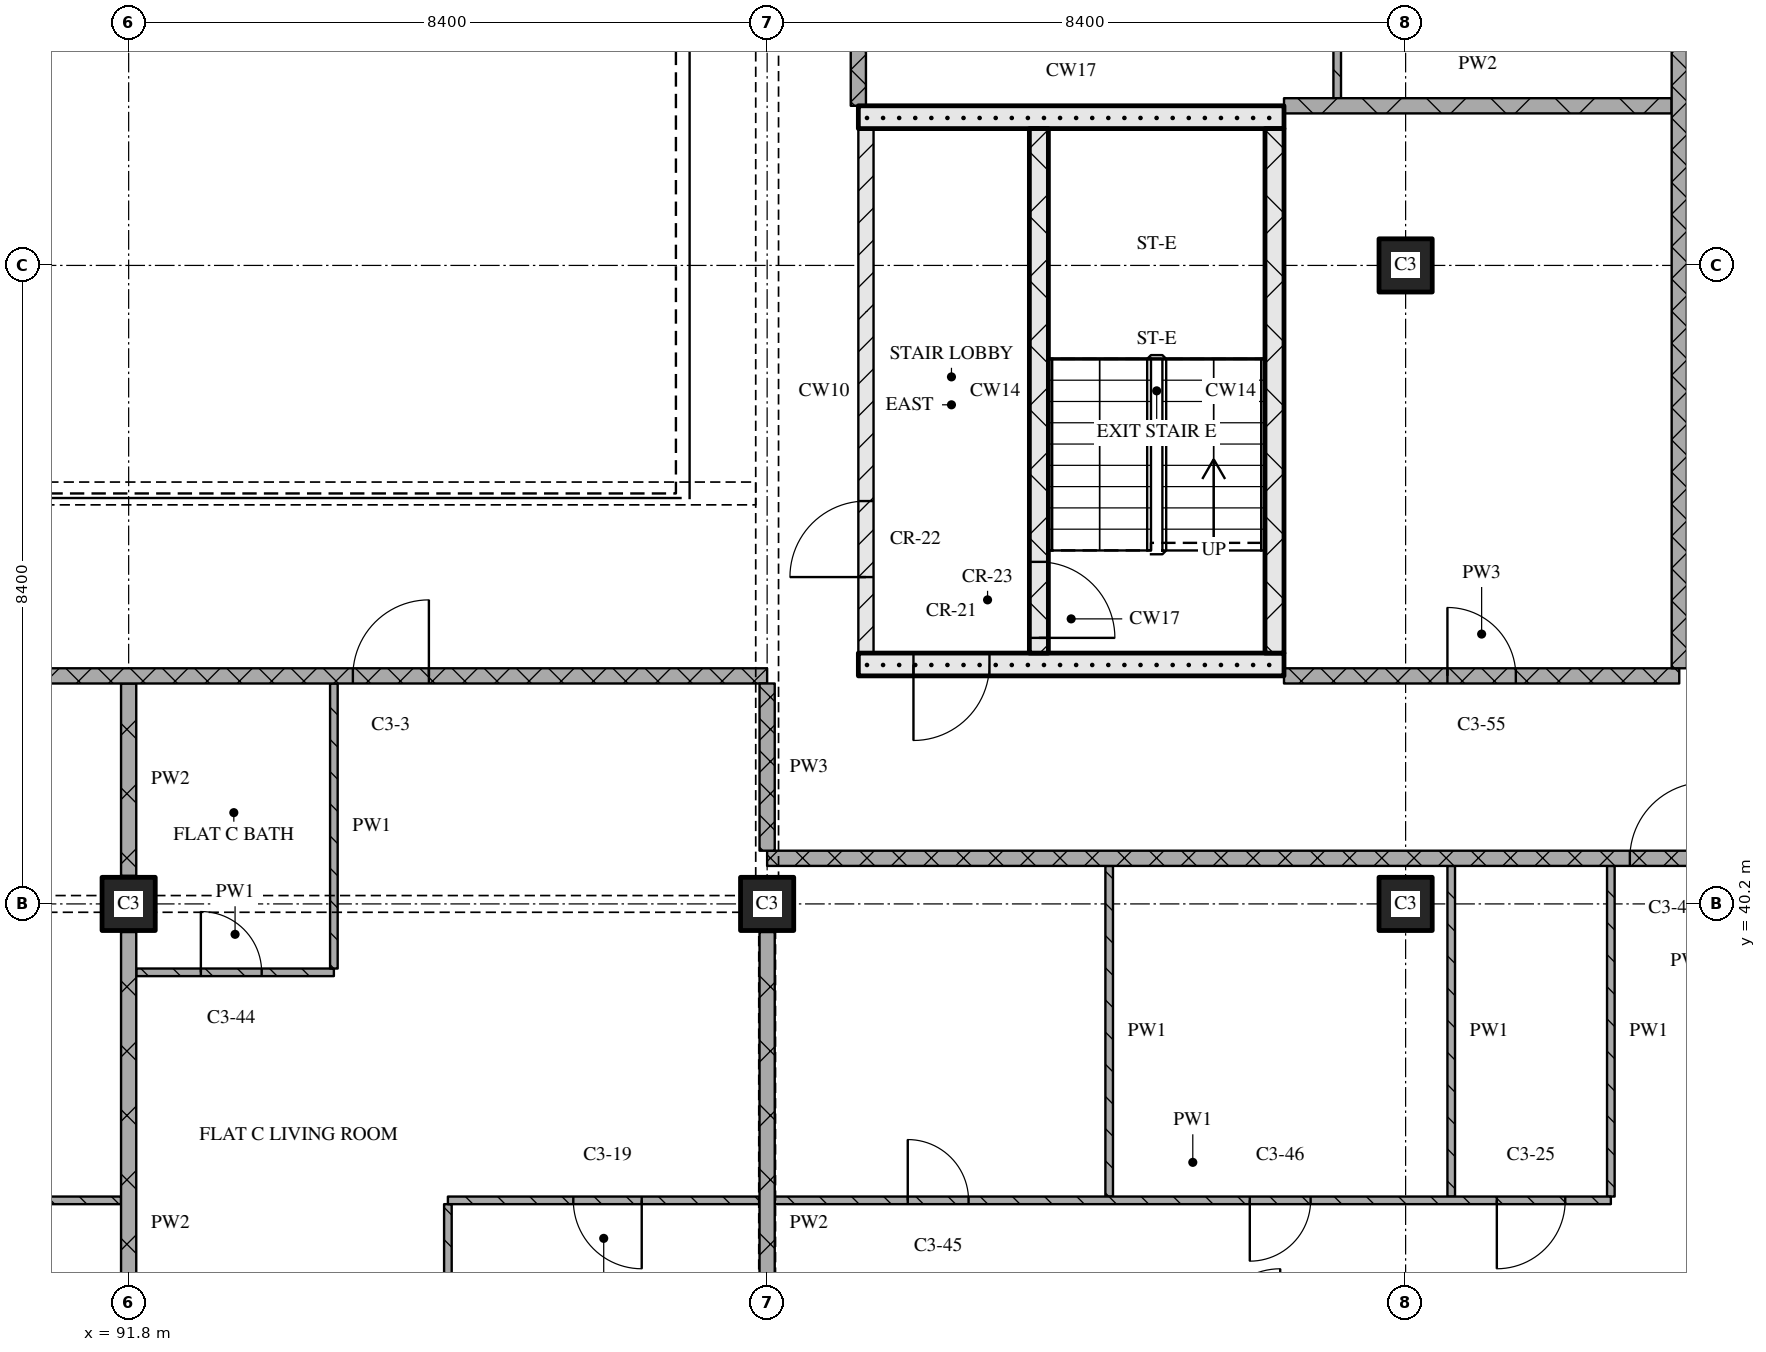
"""IFC4 building model, lengths in metres.
Left out: names, types, materials, properties, quantities, classifications, styles, units other than length and angle.
Written with IfcOpenShell. Run it as: python <this file> out.ifc"""

import sys

from ifc_helpers import new_model, si_unit, direction, frame, frame_2d, origin, origin_2d, place, context, subcontext, project, spatial, rectangle, extrude, element, fill, save


model = new_model("IFC4")
c1 = context("Model", 3, precision=1e-05, world=origin(), true_north=direction((0.0, 1.0)))
c2 = subcontext(c1, "Body", "Model", "MODEL_VIEW")
j1 = project(units=[si_unit("LENGTHUNIT", "METRE"), si_unit("PLANEANGLEUNIT", "RADIAN")], contexts=[c1])
p1 = place(None, origin())
s1 = spatial("IfcSite", under=j1, at=p1, CompositionType="ELEMENT")
p2 = place(p1, origin())
s2 = spatial("IfcBuilding", under=s1, at=p2, CompositionType="ELEMENT")
p3 = place(p2, frame((0.0, 0.0, 176.25)))
s3 = spatial("IfcBuildingStorey", under=s2, at=p3, CompositionType="ELEMENT", Elevation=176.25)
for number, where, z_axis, x_axis in (
    (1, (91.8, 40.2, 0.0), (0.0, 0.0, 1.0), (1.0, 0.0, 0.0)),
    (2, (100.2, 40.2, 0.0), (0.0, 0.0, 1.0), (1.0, 0.0, 0.0)),
    (3, (108.6, 40.2, 0.0), (0.0, 0.0, 1.0), (1.0, 0.0, 0.0)),
    (4, (108.6, 48.6, 0.0), (0.0, 0.0, 1.0), (1.0, 0.0, 0.0)),
):
    element("IfcColumn", number, at=place(p3, frame(where, z_axis=z_axis, x_axis=x_axis)), inside=s3, PredefinedType="COLUMN", context=c2, shape_type="SweptSolid", body=[
        extrude(rectangle(XDim=0.7, YDim=0.7, at=origin_2d()), origin(), (0.0, 0.0, 1.0), 3.6),
    ])
p4 = place(p3, frame((101.4, 43.35, 0.0), z_axis=(0.0, 0.0, 1.0), x_axis=(1.0, 0.0, 0.0)))
e5 = element("IfcWall", 5, at=p4, inside=s3, PredefinedType="SOLIDWALL", context=c2, shape_type="SweptSolid", body=[
    extrude(rectangle(XDim=5.6, YDim=0.3, at=frame_2d((2.8, 0.0))), origin(), (0.0, 0.0, 1.0), 3.32),
])
p5 = place(p4, frame((0.725, 0.0, 0.0)))
e6 = element("IfcOpeningElement", 6, at=p5, cuts=e5, PredefinedType="OPENING", context=c2, shape_type="SweptSolid", body=[
    extrude(rectangle(XDim=1.0, YDim=2.1, at=frame_2d((0.5, 1.05))), frame((0.0, 0.16, 0.0), z_axis=(0.0, -1.0, 0.0), x_axis=(1.0, 0.0, 0.0)), (0.0, 0.0, 1.0), 0.32),
])
p6 = place(p3, frame((101.5, 43.5, 0.0), z_axis=(0.0, 0.0, 1.0), x_axis=(0.0, 1.0, 0.0)))
e7 = element("IfcWall", 7, at=p6, inside=s3, PredefinedType="PARTITIONING", context=c2, shape_type="SweptSolid", body=[
    extrude(rectangle(XDim=6.9, YDim=0.2, at=frame_2d((3.45, 0.0))), origin(), (0.0, 0.0, 1.0), 3.32),
])
p7 = place(p6, frame((1.0, 0.0, 0.0)))
e8 = element("IfcOpeningElement", 8, at=p7, cuts=e7, PredefinedType="OPENING", context=c2, shape_type="SweptSolid", body=[
    extrude(rectangle(XDim=1.0, YDim=2.1, at=frame_2d((0.5, 1.05))), frame((0.0, 0.11, 0.0), z_axis=(0.0, -1.0, 0.0), x_axis=(1.0, 0.0, 0.0)), (0.0, 0.0, 1.0), 0.22),
])
p8 = place(p3, frame((103.775, 43.5, 0.0), z_axis=(0.0, 0.0, 1.0), x_axis=(0.0, 1.0, 0.0)))
e9 = element("IfcWall", 9, at=p8, inside=s3, PredefinedType="SOLIDWALL", context=c2, shape_type="SweptSolid", body=[
    extrude(rectangle(XDim=6.9, YDim=0.25, at=frame_2d((3.45, 0.0))), origin(), (0.0, 0.0, 1.0), 3.32),
])
p9 = place(p8, frame((0.2, 0.0, 0.0)))
e10 = element("IfcOpeningElement", 10, at=p9, cuts=e9, PredefinedType="OPENING", context=c2, shape_type="SweptSolid", body=[
    extrude(rectangle(XDim=1.0, YDim=2.1, at=frame_2d((0.5, 1.05))), frame((0.0, 0.135, 0.0), z_axis=(0.0, -1.0, 0.0), x_axis=(1.0, 0.0, 0.0)), (0.0, 0.0, 1.0), 0.27),
])
p10 = place(p3, frame((106.875, 43.5, 0.0), z_axis=(0.0, 0.0, 1.0), x_axis=(0.0, 1.0, 0.0)))
e11 = element("IfcWall", 11, at=p10, inside=s3, PredefinedType="SOLIDWALL", context=c2, shape_type="SweptSolid", body=[
    extrude(rectangle(XDim=6.9, YDim=0.25, at=frame_2d((3.45, 0.0))), origin(), (0.0, 0.0, 1.0), 3.32),
])
p11 = place(p3, frame((101.4, 50.55, 0.0), z_axis=(0.0, 0.0, 1.0), x_axis=(1.0, 0.0, 0.0)))
e12 = element("IfcWall", 12, at=p11, inside=s3, PredefinedType="SOLIDWALL", context=c2, shape_type="SweptSolid", body=[
    extrude(rectangle(XDim=5.6, YDim=0.3, at=frame_2d((2.8, 0.0))), origin(), (0.0, 0.0, 1.0), 3.32),
])
p12 = place(p3, frame((91.7, 36.3, 0.0), z_axis=(0.0, 0.0, 1.0), x_axis=(-1.0, 0.0, 0.0)))
e13 = element("IfcWall", 13, at=p12, inside=s3, PredefinedType="PARTITIONING", context=c2, shape_type="SweptSolid", body=[
    extrude(rectangle(XDim=12.5, YDim=0.1, at=frame_2d((6.25, 0.0))), origin(), (0.0, 0.0, 1.0), 3.32),
])
p13 = place(p12, frame((3.65, 0.0, 0.0)))
e14 = element("IfcOpeningElement", 14, at=p13, cuts=e13, PredefinedType="OPENING", context=c2, shape_type="SweptSolid", body=[
    extrude(rectangle(XDim=0.9, YDim=2.1, at=frame_2d((0.45, 1.05))), frame((0.0, 0.06, 0.0), z_axis=(0.0, -1.0, 0.0), x_axis=(1.0, 0.0, 0.0)), (0.0, 0.0, 1.0), 0.12),
])
p14 = place(p12, frame((9.95, 0.0, 0.0)))
e15 = element("IfcOpeningElement", 15, at=p14, cuts=e13, PredefinedType="OPENING", context=c2, shape_type="SweptSolid", body=[
    extrude(rectangle(XDim=0.9, YDim=2.1, at=frame_2d((0.45, 1.05))), frame((0.0, 0.06, 0.0), z_axis=(0.0, -1.0, 0.0), x_axis=(1.0, 0.0, 0.0)), (0.0, 0.0, 1.0), 0.12),
])
p15 = place(p3, frame((91.9, 39.3, 0.0), z_axis=(0.0, 0.0, 1.0), x_axis=(1.0, 0.0, 0.0)))
e16 = element("IfcWall", 16, at=p15, inside=s3, PredefinedType="PARTITIONING", context=c2, shape_type="SweptSolid", body=[
    extrude(rectangle(XDim=2.6, YDim=0.1, at=frame_2d((1.3, 0.0))), origin(), (0.0, 0.0, 1.0), 3.32),
])
p16 = place(p15, frame((0.85, 0.0, 0.0)))
e17 = element("IfcOpeningElement", 17, at=p16, cuts=e16, PredefinedType="OPENING", context=c2, shape_type="SweptSolid", body=[
    extrude(rectangle(XDim=0.8, YDim=2.1, at=frame_2d((0.4, 1.05))), frame((0.0, 0.06, 0.0), z_axis=(0.0, -1.0, 0.0), x_axis=(1.0, 0.0, 0.0)), (0.0, 0.0, 1.0), 0.12),
])
p17 = place(p3, frame((124.48, 40.8, 0.0), z_axis=(0.0, 0.0, 1.0), x_axis=(-1.0, 0.0, 0.0)))
e18 = element("IfcWall", 18, at=p17, inside=s3, PredefinedType="PARTITIONING", context=c2, shape_type="SweptSolid", body=[
    extrude(rectangle(XDim=24.28, YDim=0.2, at=frame_2d((12.14, 0.0))), origin(), (0.0, 0.0, 1.0), 3.32),
])
p18 = place(p17, frame((11.93, 0.0, 0.0)))
e19 = element("IfcOpeningElement", 19, at=p18, cuts=e18, PredefinedType="OPENING", context=c2, shape_type="SweptSolid", body=[
    extrude(rectangle(XDim=1.0, YDim=2.1, at=frame_2d((0.5, 1.05))), frame((0.0, 0.11, 0.0), z_axis=(0.0, -1.0, 0.0), x_axis=(1.0, 0.0, 0.0)), (0.0, 0.0, 1.0), 0.22),
])
p19 = place(p3, frame((100.2, 43.2, 0.0), z_axis=(0.0, 0.0, 1.0), x_axis=(-1.0, 0.0, 0.0)))
e20 = element("IfcWall", 20, at=p19, inside=s3, PredefinedType="PARTITIONING", context=c2, shape_type="SweptSolid", body=[
    extrude(rectangle(XDim=25.2, YDim=0.2, at=frame_2d((12.6, 0.0))), origin(), (0.0, 0.0, 1.0), 3.32),
])
p20 = place(p19, frame((4.45, 0.0, 0.0)))
e21 = element("IfcOpeningElement", 21, at=p20, cuts=e20, PredefinedType="OPENING", context=c2, shape_type="SweptSolid", body=[
    extrude(rectangle(XDim=1.0, YDim=2.1, at=frame_2d((0.5, 1.05))), frame((0.0, 0.11, 0.0), z_axis=(0.0, -1.0, 0.0), x_axis=(1.0, 0.0, 0.0)), (0.0, 0.0, 1.0), 0.22),
])
p21 = place(p19, frame((17.05, 0.0, 0.0)))
e22 = element("IfcOpeningElement", 22, at=p21, cuts=e20, PredefinedType="OPENING", context=c2, shape_type="SweptSolid", body=[
    extrude(rectangle(XDim=1.0, YDim=2.1, at=frame_2d((0.5, 1.05))), frame((0.0, 0.11, 0.0), z_axis=(0.0, -1.0, 0.0), x_axis=(1.0, 0.0, 0.0)), (0.0, 0.0, 1.0), 0.22),
])
p22 = place(p3, frame((107.0, 43.2, 0.0), z_axis=(0.0, 0.0, 1.0), x_axis=(1.0, 0.0, 0.0)))
e23 = element("IfcWall", 23, at=p22, inside=s3, PredefinedType="PARTITIONING", context=c2, shape_type="SweptSolid", body=[
    extrude(rectangle(XDim=5.2, YDim=0.2, at=frame_2d((2.6, 0.0))), origin(), (0.0, 0.0, 1.0), 3.32),
])
p23 = place(p22, frame((2.15, 0.0, 0.0)))
e24 = element("IfcOpeningElement", 24, at=p23, cuts=e23, PredefinedType="OPENING", context=c2, shape_type="SweptSolid", body=[
    extrude(rectangle(XDim=0.9, YDim=2.1, at=frame_2d((0.45, 1.05))), frame((0.0, 0.11, 0.0), z_axis=(0.0, -1.0, 0.0), x_axis=(1.0, 0.0, 0.0)), (0.0, 0.0, 1.0), 0.22),
])
p24 = place(p3, frame((107.0, 50.7, 0.0), z_axis=(0.0, 0.0, 1.0), x_axis=(1.0, 0.0, 0.0)))
e25 = element("IfcWall", 25, at=p24, inside=s3, PredefinedType="PARTITIONING", context=c2, shape_type="SweptSolid", body=[
    extrude(rectangle(XDim=5.1, YDim=0.2, at=frame_2d((2.55, 0.0))), origin(), (0.0, 0.0, 1.0), 3.32),
])
p25 = place(p3, frame((91.8, 39.83, 0.0), z_axis=(0.0, 0.0, 1.0), x_axis=(0.0, -1.0, 0.0)))
e26 = element("IfcWall", 26, at=p25, inside=s3, PredefinedType="PARTITIONING", context=c2, shape_type="SweptSolid", body=[
    extrude(rectangle(XDim=7.66, YDim=0.2, at=frame_2d((3.83, 0.0))), origin(), (0.0, 0.0, 1.0), 3.32),
])
p26 = place(p3, frame((91.8, 43.1, 0.0), z_axis=(0.0, 0.0, 1.0), x_axis=(0.0, -1.0, 0.0)))
e27 = element("IfcWall", 27, at=p26, inside=s3, PredefinedType="PARTITIONING", context=c2, shape_type="SweptSolid", body=[
    extrude(rectangle(XDim=2.53, YDim=0.2, at=frame_2d((1.265, 0.0))), origin(), (0.0, 0.0, 1.0), 3.32),
])
p27 = place(p3, frame((94.5, 43.1, 0.0), z_axis=(0.0, 0.0, 1.0), x_axis=(0.0, -1.0, 0.0)))
e28 = element("IfcWall", 28, at=p27, inside=s3, PredefinedType="PARTITIONING", context=c2, shape_type="SweptSolid", body=[
    extrude(rectangle(XDim=3.75, YDim=0.1, at=frame_2d((1.875, 0.0))), origin(), (0.0, 0.0, 1.0), 3.32),
])
p28 = place(p3, frame((96.0, 36.25, 0.0), z_axis=(0.0, 0.0, 1.0), x_axis=(0.0, -1.0, 0.0)))
e29 = element("IfcWall", 29, at=p28, inside=s3, PredefinedType="PARTITIONING", context=c2, shape_type="SweptSolid", body=[
    extrude(rectangle(XDim=5.97, YDim=0.1, at=frame_2d((2.985, 0.0))), origin(), (0.0, 0.0, 1.0), 3.32),
])
p29 = place(p3, frame((100.2, 43.1, 0.0), z_axis=(0.0, 0.0, 1.0), x_axis=(0.0, -1.0, 0.0)))
e30 = element("IfcWall", 30, at=p29, inside=s3, PredefinedType="PARTITIONING", context=c2, shape_type="SweptSolid", body=[
    extrude(rectangle(XDim=2.2, YDim=0.2, at=frame_2d((1.1, 0.0))), origin(), (0.0, 0.0, 1.0), 2.43),
])
p30 = place(p3, frame((100.2, 39.83, 0.0), z_axis=(0.0, 0.0, 1.0), x_axis=(0.0, -1.0, 0.0)))
e31 = element("IfcWall", 31, at=p30, inside=s3, PredefinedType="PARTITIONING", context=c2, shape_type="SweptSolid", body=[
    extrude(rectangle(XDim=7.66, YDim=0.2, at=frame_2d((3.83, 0.0))), origin(), (0.0, 0.0, 1.0), 2.72),
])
p31 = place(p3, frame((101.4, 58.7, 0.0), z_axis=(0.0, 0.0, 1.0), x_axis=(0.0, -1.0, 0.0)))
e32 = element("IfcWall", 32, at=p31, inside=s3, PredefinedType="PARTITIONING", context=c2, shape_type="SweptSolid", body=[
    extrude(rectangle(XDim=8.0, YDim=0.2, at=frame_2d((4.0, 0.0))), origin(), (0.0, 0.0, 1.0), 3.32),
])
p32 = place(p31, frame((5.225, 0.0, 0.9)))
e33 = element("IfcOpeningElement", 33, at=p32, cuts=e32, PredefinedType="OPENING", context=c2, shape_type="SweptSolid", body=[
    extrude(rectangle(XDim=1.5, YDim=1.5, at=frame_2d((0.75, 0.75))), frame((0.0, 0.11, 0.0), z_axis=(0.0, -1.0, 0.0), x_axis=(1.0, 0.0, 0.0)), (0.0, 0.0, 1.0), 0.22),
])
p33 = place(p3, frame((104.7, 40.7, 0.0), z_axis=(0.0, 0.0, 1.0), x_axis=(0.0, -1.0, 0.0)))
e34 = element("IfcWall", 34, at=p33, inside=s3, PredefinedType="PARTITIONING", context=c2, shape_type="SweptSolid", body=[
    extrude(rectangle(XDim=4.35, YDim=0.1, at=frame_2d((2.175, 0.0))), origin(), (0.0, 0.0, 1.0), 3.32),
])
p34 = place(p3, frame((107.7, 50.8, 0.0), z_axis=(0.0, 0.0, 1.0), x_axis=(0.0, 1.0, 0.0)))
e35 = element("IfcWall", 35, at=p34, inside=s3, PredefinedType="PARTITIONING", context=c2, shape_type="SweptSolid", body=[
    extrude(rectangle(XDim=3.9, YDim=0.1, at=frame_2d((1.95, 0.0))), origin(), (0.0, 0.0, 1.0), 3.32),
])
p35 = place(p34, frame((1.475, 0.0, 0.0)))
e36 = element("IfcOpeningElement", 36, at=p35, cuts=e35, PredefinedType="OPENING", context=c2, shape_type="SweptSolid", body=[
    extrude(rectangle(XDim=0.9, YDim=2.1, at=frame_2d((0.45, 1.05))), frame((0.0, 0.06, 0.0), z_axis=(0.0, -1.0, 0.0), x_axis=(1.0, 0.0, 0.0)), (0.0, 0.0, 1.0), 0.12),
])
for number, where, z_axis, x_axis in (
    (37, (109.2, 40.7, 0.0), (0.0, 0.0, 1.0), (0.0, -1.0, 0.0)),
    (38, (111.3, 40.7, 0.0), (0.0, 0.0, 1.0), (0.0, -1.0, 0.0)),
):
    element("IfcWall", number, at=place(p3, frame(where, z_axis=z_axis, x_axis=x_axis)), inside=s3, PredefinedType="PARTITIONING", context=c2, shape_type="SweptSolid", body=[
        extrude(rectangle(XDim=4.35, YDim=0.1, at=frame_2d((2.175, 0.0))), origin(), (0.0, 0.0, 1.0), 3.32),
    ])
p36 = place(p3, frame((112.2, 58.7, 0.0), z_axis=(0.0, 0.0, 1.0), x_axis=(0.0, -1.0, 0.0)))
e39 = element("IfcWall", 39, at=p36, inside=s3, PredefinedType="PARTITIONING", context=c2, shape_type="SweptSolid", body=[
    extrude(rectangle(XDim=15.4, YDim=0.2, at=frame_2d((7.7, 0.0))), origin(), (0.0, 0.0, 1.0), 3.32),
])
p37 = place(p3, frame((100.1, 36.3, 0.0), z_axis=(0.0, 0.0, 1.0), x_axis=(-1.0, 0.0, 0.0)))
e40 = element("IfcWall", 40, at=p37, inside=s3, PredefinedType="PARTITIONING", context=c2, shape_type="SweptSolid", body=[
    extrude(rectangle(XDim=4.1, YDim=0.1, at=frame_2d((2.05, 0.0))), origin(), (0.0, 0.0, 1.0), 3.32),
])
p38 = place(p37, frame((1.55, 0.0, 0.0)))
e41 = element("IfcOpeningElement", 41, at=p38, cuts=e40, PredefinedType="OPENING", context=c2, shape_type="SweptSolid", body=[
    extrude(rectangle(XDim=0.9, YDim=2.1, at=frame_2d((0.45, 1.05))), frame((0.0, 0.06, 0.0), z_axis=(0.0, -1.0, 0.0), x_axis=(1.0, 0.0, 0.0)), (0.0, 0.0, 1.0), 0.12),
])
p39 = place(p3, frame((100.3, 36.3, 0.0), z_axis=(0.0, 0.0, 1.0), x_axis=(1.0, 0.0, 0.0)))
e42 = element("IfcWall", 42, at=p39, inside=s3, PredefinedType="PARTITIONING", context=c2, shape_type="SweptSolid", body=[
    extrude(rectangle(XDim=11.0, YDim=0.1, at=frame_2d((5.5, 0.0))), origin(), (0.0, 0.0, 1.0), 3.32),
])
p40 = place(p39, frame((1.75, 0.0, 0.0)))
e43 = element("IfcOpeningElement", 43, at=p40, cuts=e42, PredefinedType="OPENING", context=c2, shape_type="SweptSolid", body=[
    extrude(rectangle(XDim=0.8, YDim=2.1, at=frame_2d((0.4, 1.05))), frame((0.0, 0.06, 0.0), z_axis=(0.0, -1.0, 0.0), x_axis=(1.0, 0.0, 0.0)), (0.0, 0.0, 1.0), 0.12),
])
p41 = place(p39, frame((6.25, 0.0, 0.0)))
e44 = element("IfcOpeningElement", 44, at=p41, cuts=e42, PredefinedType="OPENING", context=c2, shape_type="SweptSolid", body=[
    extrude(rectangle(XDim=0.8, YDim=2.1, at=frame_2d((0.4, 1.05))), frame((0.0, 0.06, 0.0), z_axis=(0.0, -1.0, 0.0), x_axis=(1.0, 0.0, 0.0)), (0.0, 0.0, 1.0), 0.12),
])
p42 = place(p39, frame((9.5, 0.0, 0.0)))
e45 = element("IfcOpeningElement", 45, at=p42, cuts=e42, PredefinedType="OPENING", context=c2, shape_type="SweptSolid", body=[
    extrude(rectangle(XDim=0.9, YDim=2.1, at=frame_2d((0.45, 1.05))), frame((0.0, 0.06, 0.0), z_axis=(0.0, -1.0, 0.0), x_axis=(1.0, 0.0, 0.0)), (0.0, 0.0, 1.0), 0.12),
])
p43 = place(p5, origin())
e46 = element("IfcDoor", 46, at=p43, inside=s3, OperationType="SINGLE_SWING_RIGHT", PredefinedType="DOOR", context=c2, shape_type="SweptSolid", body=[
    extrude(rectangle(XDim=1.0, YDim=2.1, at=frame_2d((0.5, 1.05))), frame((0.0, 0.025, 0.0), z_axis=(0.0, -1.0, 0.0), x_axis=(1.0, 0.0, 0.0)), (0.0, 0.0, 1.0), 0.05),
])
fill(e6, e46)
p44 = place(p9, origin())
e47 = element("IfcDoor", 47, at=p44, inside=s3, OperationType="SINGLE_SWING_RIGHT", PredefinedType="DOOR", context=c2, shape_type="SweptSolid", body=[
    extrude(rectangle(XDim=1.0, YDim=2.1, at=frame_2d((0.5, 1.05))), frame((0.0, 0.025, 0.0), z_axis=(0.0, -1.0, 0.0), x_axis=(1.0, 0.0, 0.0)), (0.0, 0.0, 1.0), 0.05),
])
fill(e10, e47)
p45 = place(p7, origin())
e48 = element("IfcDoor", 48, at=p45, inside=s3, OperationType="SINGLE_SWING_LEFT", PredefinedType="DOOR", context=c2, shape_type="SweptSolid", body=[
    extrude(rectangle(XDim=1.0, YDim=2.1, at=frame_2d((0.5, 1.05))), frame((0.0, 0.025, 0.0), z_axis=(0.0, -1.0, 0.0), x_axis=(1.0, 0.0, 0.0)), (0.0, 0.0, 1.0), 0.05),
])
fill(e8, e48)
p46 = place(p16, origin())
e49 = element("IfcDoor", 49, at=p46, inside=s3, OperationType="SINGLE_SWING_LEFT", PredefinedType="DOOR", context=c2, shape_type="SweptSolid", body=[
    extrude(rectangle(XDim=0.8, YDim=2.1, at=frame_2d((0.4, 1.05))), frame((0.0, 0.025, 0.0), z_axis=(0.0, -1.0, 0.0), x_axis=(1.0, 0.0, 0.0)), (0.0, 0.0, 1.0), 0.05),
])
fill(e17, e49)
p47 = place(p18, origin())
e50 = element("IfcDoor", 50, at=p47, inside=s3, OperationType="SINGLE_SWING_RIGHT", PredefinedType="DOOR", context=c2, shape_type="SweptSolid", body=[
    extrude(rectangle(XDim=1.0, YDim=2.1, at=frame_2d((0.5, 1.05))), frame((0.0, 0.025, 0.0), z_axis=(0.0, -1.0, 0.0), x_axis=(1.0, 0.0, 0.0)), (0.0, 0.0, 1.0), 0.05),
])
fill(e19, e50)
p48 = place(p20, origin())
e51 = element("IfcDoor", 51, at=p48, inside=s3, OperationType="SINGLE_SWING_RIGHT", PredefinedType="DOOR", context=c2, shape_type="SweptSolid", body=[
    extrude(rectangle(XDim=1.0, YDim=2.1, at=frame_2d((0.5, 1.05))), frame((0.0, 0.025, 0.0), z_axis=(0.0, -1.0, 0.0), x_axis=(1.0, 0.0, 0.0)), (0.0, 0.0, 1.0), 0.05),
])
fill(e21, e51)
p49 = place(p23, origin())
e52 = element("IfcDoor", 52, at=p49, inside=s3, OperationType="SINGLE_SWING_LEFT", PredefinedType="DOOR", context=c2, shape_type="SweptSolid", body=[
    extrude(rectangle(XDim=0.9, YDim=2.1, at=frame_2d((0.45, 1.05))), frame((0.0, 0.025, 0.0), z_axis=(0.0, -1.0, 0.0), x_axis=(1.0, 0.0, 0.0)), (0.0, 0.0, 1.0), 0.05),
])
fill(e24, e52)
p50 = place(p38, origin())
e53 = element("IfcDoor", 53, at=p50, inside=s3, OperationType="SINGLE_SWING_LEFT", PredefinedType="DOOR", context=c2, shape_type="SweptSolid", body=[
    extrude(rectangle(XDim=0.9, YDim=2.1, at=frame_2d((0.45, 1.05))), frame((0.0, 0.025, 0.0), z_axis=(0.0, -1.0, 0.0), x_axis=(1.0, 0.0, 0.0)), (0.0, 0.0, 1.0), 0.05),
])
fill(e41, e53)
p51 = place(p40, origin())
e54 = element("IfcDoor", 54, at=p51, inside=s3, OperationType="SINGLE_SWING_LEFT", PredefinedType="DOOR", context=c2, shape_type="SweptSolid", body=[
    extrude(rectangle(XDim=0.8, YDim=2.1, at=frame_2d((0.4, 1.05))), frame((0.0, 0.025, 0.0), z_axis=(0.0, -1.0, 0.0), x_axis=(1.0, 0.0, 0.0)), (0.0, 0.0, 1.0), 0.05),
])
fill(e43, e54)
p52 = place(p41, origin())
e55 = element("IfcDoor", 55, at=p52, inside=s3, OperationType="SINGLE_SWING_RIGHT", PredefinedType="DOOR", context=c2, shape_type="SweptSolid", body=[
    extrude(rectangle(XDim=0.8, YDim=2.1, at=frame_2d((0.4, 1.05))), frame((0.0, 0.025, 0.0), z_axis=(0.0, -1.0, 0.0), x_axis=(1.0, 0.0, 0.0)), (0.0, 0.0, 1.0), 0.05),
])
fill(e44, e55)
p53 = place(p42, origin())
e56 = element("IfcDoor", 56, at=p53, inside=s3, OperationType="SINGLE_SWING_RIGHT", PredefinedType="DOOR", context=c2, shape_type="SweptSolid", body=[
    extrude(rectangle(XDim=0.9, YDim=2.1, at=frame_2d((0.45, 1.05))), frame((0.0, 0.025, 0.0), z_axis=(0.0, -1.0, 0.0), x_axis=(1.0, 0.0, 0.0)), (0.0, 0.0, 1.0), 0.05),
])
fill(e45, e56)
save(model, sys.argv[1])
